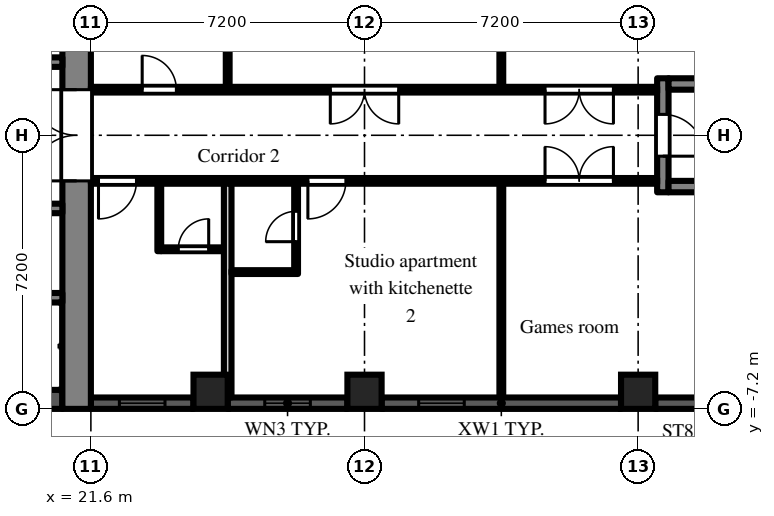
"""IFC4 building model, lengths in metres.
Left out: names, types, materials, properties, quantities, classifications, styles, units other than length and angle.
Written with IfcOpenShell. Run it as: python <this file> out.ifc"""

import sys

from ifc_helpers import new_model, si_unit, direction, frame, frame_2d, origin, origin_2d, place, context, subcontext, project, spatial, rectangle, extrude, element, fill, save


model = new_model("IFC4")
c1 = context("Model", 3, precision=1e-05, world=origin(), true_north=direction((0.0, 1.0)))
c2 = subcontext(c1, "Body", "Model", "MODEL_VIEW")
j1 = project(units=[si_unit("LENGTHUNIT", "METRE"), si_unit("PLANEANGLEUNIT", "RADIAN")], contexts=[c1])
p1 = place(None, origin())
s1 = spatial("IfcSite", under=j1, at=p1, CompositionType="ELEMENT")
p2 = place(p1, origin())
s2 = spatial("IfcBuilding", under=s1, at=p2, CompositionType="ELEMENT")
p3 = place(p2, frame((0.0, 0.0, 69.9)))
s3 = spatial("IfcBuildingStorey", under=s2, at=p3, CompositionType="ELEMENT", Elevation=69.9)
for number, where, z_axis, x_axis in (
    (1, (24.75, -6.75, 0.0), (0.0, 0.0, 1.0), (1.0, 0.0, 0.0)),
    (2, (28.8, -6.75, 0.0), (0.0, 0.0, 1.0), (1.0, 0.0, 0.0)),
    (3, (36.0, -6.75, 0.0), (0.0, 0.0, 1.0), (1.0, 0.0, 0.0)),
):
    element("IfcColumn", number, at=place(p3, frame(where, z_axis=z_axis, x_axis=x_axis)), inside=s3, PredefinedType="COLUMN", context=c2, shape_type="SweptSolid", body=[
        extrude(rectangle(XDim=0.9, YDim=0.9, at=origin_2d()), origin(), (0.0, 0.0, 1.0), 3.0),
    ])
p4 = place(p3, frame((21.6, -7.05, 0.0), z_axis=(0.0, 0.0, 1.0), x_axis=(1.0, 0.0, 0.0)))
e4 = element("IfcWall", 4, at=p4, inside=s3, PredefinedType="SOLIDWALL", context=c2, shape_type="SweptSolid", body=[
    extrude(rectangle(XDim=2.7, YDim=0.3, at=frame_2d((1.35, 0.0))), origin(), (0.0, 0.0, 1.0), 2.1),
])
p5 = place(p4, frame((0.75, 0.0, 0.2)))
e5 = element("IfcOpeningElement", 5, at=p5, cuts=e4, PredefinedType="OPENING", context=c2, shape_type="SweptSolid", body=[
    extrude(rectangle(XDim=1.2, YDim=1.85, at=frame_2d((0.6, 0.925))), frame((0.0, 0.16, 0.0), z_axis=(0.0, -1.0, 0.0), x_axis=(1.0, 0.0, 0.0)), (0.0, 0.0, 1.0), 0.32),
])
p6 = place(p3, frame((25.2, -7.05, 0.0), z_axis=(0.0, 0.0, 1.0), x_axis=(1.0, 0.0, 0.0)))
e6 = element("IfcWall", 6, at=p6, inside=s3, PredefinedType="SOLIDWALL", context=c2, shape_type="SweptSolid", body=[
    extrude(rectangle(XDim=3.15, YDim=0.3, at=frame_2d((1.575, 0.0))), origin(), (0.0, 0.0, 1.0), 2.1),
])
p7 = place(p6, frame((0.975, 0.0, 0.2)))
e7 = element("IfcOpeningElement", 7, at=p7, cuts=e6, PredefinedType="OPENING", context=c2, shape_type="SweptSolid", body=[
    extrude(rectangle(XDim=1.2, YDim=1.85, at=frame_2d((0.6, 0.925))), frame((0.0, 0.16, 0.0), z_axis=(0.0, -1.0, 0.0), x_axis=(1.0, 0.0, 0.0)), (0.0, 0.0, 1.0), 0.32),
])
p8 = place(p3, frame((29.25, -7.05, 0.0), z_axis=(0.0, 0.0, 1.0), x_axis=(1.0, 0.0, 0.0)))
e8 = element("IfcWall", 8, at=p8, inside=s3, PredefinedType="SOLIDWALL", context=c2, shape_type="SweptSolid", body=[
    extrude(rectangle(XDim=6.3, YDim=0.3, at=frame_2d((3.15, 0.0))), origin(), (0.0, 0.0, 1.0), 2.1),
])
p9 = place(p8, frame((0.975, 0.0, 0.2)))
e9 = element("IfcOpeningElement", 9, at=p9, cuts=e8, PredefinedType="OPENING", context=c2, shape_type="SweptSolid", body=[
    extrude(rectangle(XDim=1.2, YDim=1.85, at=frame_2d((0.6, 0.925))), frame((0.0, 0.16, 0.0), z_axis=(0.0, -1.0, 0.0), x_axis=(1.0, 0.0, 0.0)), (0.0, 0.0, 1.0), 0.32),
])
p10 = place(p3, frame((36.45, -7.05, 0.0), z_axis=(0.0, 0.0, 1.0), x_axis=(1.0, 0.0, 0.0)))
e10 = element("IfcWall", 10, at=p10, inside=s3, PredefinedType="SOLIDWALL", context=c2, shape_type="SweptSolid", body=[
    extrude(rectangle(XDim=2.25, YDim=0.3, at=frame_2d((1.125, 0.0))), origin(), (0.0, 0.0, 1.0), 2.1),
])
p11 = place(p3, frame((21.225, -7.2, 0.0), z_axis=(0.0, 0.0, 1.0), x_axis=(0.0, 1.0, 0.0)))
e11 = element("IfcWall", 11, at=p11, inside=s3, PredefinedType="SHEAR", context=c2, shape_type="SweptSolid", body=[
    extrude(rectangle(XDim=14.4, YDim=0.75, at=frame_2d((7.2, 0.0))), origin(), (0.0, 0.0, 1.0), 2.575),
])
p12 = place(p11, frame((6.0, 0.0, 0.0)))
e12 = element("IfcOpeningElement", 12, at=p12, cuts=e11, PredefinedType="OPENING", context=c2, shape_type="SweptSolid", body=[
    extrude(rectangle(XDim=2.4, YDim=2.2, at=frame_2d((1.2, 1.1))), frame((0.0, 0.385, 0.0), z_axis=(0.0, -1.0, 0.0), x_axis=(1.0, 0.0, 0.0)), (0.0, 0.0, 1.0), 0.77),
])
p13 = place(p3, frame((7.9, 1.925, 0.0), z_axis=(0.0, 0.0, 1.0), x_axis=(1.0, 0.0, 0.0)))
e13 = element("IfcWall", 13, at=p13, inside=s3, PredefinedType="SHEAR", context=c2, shape_type="SweptSolid", body=[
    extrude(rectangle(XDim=12.95, YDim=0.25, at=frame_2d((6.475, 0.0))), origin(), (0.0, 0.0, 1.0), 2.575),
])
p14 = place(p13, frame((0.525, 0.0, 0.0)))
e14 = element("IfcOpeningElement", 14, at=p14, cuts=e13, PredefinedType="OPENING", context=c2, shape_type="SweptSolid", body=[
    extrude(rectangle(XDim=0.9, YDim=2.1, at=frame_2d((0.45, 1.05))), frame((0.0, 0.135, 0.0), z_axis=(0.0, -1.0, 0.0), x_axis=(1.0, 0.0, 0.0)), (0.0, 0.0, 1.0), 0.27),
])
p15 = place(p13, frame((2.625, 0.0, 0.0)))
e15 = element("IfcOpeningElement", 15, at=p15, cuts=e13, PredefinedType="OPENING", context=c2, shape_type="SweptSolid", body=[
    extrude(rectangle(XDim=1.1, YDim=2.1, at=frame_2d((0.55, 1.05))), frame((0.0, 0.135, 0.0), z_axis=(0.0, -1.0, 0.0), x_axis=(1.0, 0.0, 0.0)), (0.0, 0.0, 1.0), 0.27),
])
p16 = place(p13, frame((7.125, 0.0, 0.0)))
e16 = element("IfcOpeningElement", 16, at=p16, cuts=e13, PredefinedType="OPENING", context=c2, shape_type="SweptSolid", body=[
    extrude(rectangle(XDim=0.9, YDim=2.1, at=frame_2d((0.45, 1.05))), frame((0.0, 0.135, 0.0), z_axis=(0.0, -1.0, 0.0), x_axis=(1.0, 0.0, 0.0)), (0.0, 0.0, 1.0), 0.27),
])
p17 = place(p3, frame((7.9, -6.95, 0.0), z_axis=(0.0, 0.0, 1.0), x_axis=(1.0, 0.0, 0.0)))
e17 = element("IfcWall", 17, at=p17, inside=s3, PredefinedType="SHEAR", context=c2, shape_type="SweptSolid", body=[
    extrude(rectangle(XDim=12.95, YDim=0.5, at=frame_2d((6.475, 0.0))), origin(), (0.0, 0.0, 1.0), 2.575),
])
p18 = place(p3, frame((7.9, -1.925, 0.0), z_axis=(0.0, 0.0, 1.0), x_axis=(1.0, 0.0, 0.0)))
e18 = element("IfcWall", 18, at=p18, inside=s3, PredefinedType="SHEAR", context=c2, shape_type="SweptSolid", body=[
    extrude(rectangle(XDim=12.95, YDim=0.25, at=frame_2d((6.475, 0.0))), origin(), (0.0, 0.0, 1.0), 2.575),
])
p19 = place(p18, frame((4.825, 0.0, 0.0)))
e19 = element("IfcOpeningElement", 19, at=p19, cuts=e18, PredefinedType="OPENING", context=c2, shape_type="SweptSolid", body=[
    extrude(rectangle(XDim=1.1, YDim=2.1, at=frame_2d((0.55, 1.05))), frame((0.0, 0.135, 0.0), z_axis=(0.0, -1.0, 0.0), x_axis=(1.0, 0.0, 0.0)), (0.0, 0.0, 1.0), 0.27),
])
p20 = place(p18, frame((7.025, 0.0, 0.0)))
e20 = element("IfcOpeningElement", 20, at=p20, cuts=e18, PredefinedType="OPENING", context=c2, shape_type="SweptSolid", body=[
    extrude(rectangle(XDim=1.1, YDim=2.1, at=frame_2d((0.55, 1.05))), frame((0.0, 0.135, 0.0), z_axis=(0.0, -1.0, 0.0), x_axis=(1.0, 0.0, 0.0)), (0.0, 0.0, 1.0), 0.27),
])
p21 = place(p18, frame((9.225, 0.0, 0.0)))
e21 = element("IfcOpeningElement", 21, at=p21, cuts=e18, PredefinedType="OPENING", context=c2, shape_type="SweptSolid", body=[
    extrude(rectangle(XDim=1.1, YDim=2.1, at=frame_2d((0.55, 1.05))), frame((0.0, 0.135, 0.0), z_axis=(0.0, -1.0, 0.0), x_axis=(1.0, 0.0, 0.0)), (0.0, 0.0, 1.0), 0.27),
])
p22 = place(p18, frame((0.525, 0.0, 0.0)))
e22 = element("IfcOpeningElement", 22, at=p22, cuts=e18, PredefinedType="OPENING", context=c2, shape_type="SweptSolid", body=[
    extrude(rectangle(XDim=0.9, YDim=2.1, at=frame_2d((0.45, 1.05))), frame((0.0, 0.135, 0.0), z_axis=(0.0, -1.0, 0.0), x_axis=(1.0, 0.0, 0.0)), (0.0, 0.0, 1.0), 0.27),
])
p23 = place(p18, frame((2.625, 0.0, 0.0)))
e23 = element("IfcOpeningElement", 23, at=p23, cuts=e18, PredefinedType="OPENING", context=c2, shape_type="SweptSolid", body=[
    extrude(rectangle(XDim=1.1, YDim=2.1, at=frame_2d((0.55, 1.05))), frame((0.0, 0.135, 0.0), z_axis=(0.0, -1.0, 0.0), x_axis=(1.0, 0.0, 0.0)), (0.0, 0.0, 1.0), 0.27),
])
p24 = place(p3, frame((12.3, -4.275, 0.0), z_axis=(0.0, 0.0, 1.0), x_axis=(1.0, 0.0, 0.0)))
e24 = element("IfcWall", 24, at=p24, inside=s3, PredefinedType="SHEAR", context=c2, shape_type="SweptSolid", body=[
    extrude(rectangle(XDim=8.55, YDim=0.25, at=frame_2d((4.275, 0.0))), origin(), (0.0, 0.0, 1.0), 2.575),
])
p25 = place(p3, frame((36.65, -1.5, 0.0), z_axis=(0.0, 0.0, 1.0), x_axis=(0.0, 1.0, 0.0)))
e25 = element("IfcWall", 25, at=p25, inside=s3, PredefinedType="SHEAR", context=c2, shape_type="SweptSolid", body=[
    extrude(rectangle(XDim=3.0, YDim=0.3, at=frame_2d((1.5, 0.0))), origin(), (0.0, 0.0, 1.0), 2.575),
])
p26 = place(p25, frame((0.95, 0.0, 0.0)))
e26 = element("IfcOpeningElement", 26, at=p26, cuts=e25, PredefinedType="OPENING", context=c2, shape_type="SweptSolid", body=[
    extrude(rectangle(XDim=1.1, YDim=2.1, at=frame_2d((0.55, 1.05))), frame((0.0, 0.16, 0.0), z_axis=(0.0, -1.0, 0.0), x_axis=(1.0, 0.0, 0.0)), (0.0, 0.0, 1.0), 0.32),
])
for number, where, z_axis, x_axis in (
    (27, (36.8, -1.35, 0.0), (0.0, 0.0, 1.0), (1.0, 0.0, 0.0)),
    (28, (36.8, 1.35, 0.0), (0.0, 0.0, 1.0), (1.0, 0.0, 0.0)),
):
    element("IfcWall", number, at=place(p3, frame(where, z_axis=z_axis, x_axis=x_axis)), inside=s3, PredefinedType="SHEAR", context=c2, shape_type="SweptSolid", body=[
        extrude(rectangle(XDim=5.8, YDim=0.3, at=frame_2d((2.9, 0.0))), origin(), (0.0, 0.0, 1.0), 2.575),
    ])
p27 = place(p3, frame((21.6, -1.2, 0.0), z_axis=(0.0, 0.0, 1.0), x_axis=(1.0, 0.0, 0.0)))
e29 = element("IfcWall", 29, at=p27, inside=s3, PredefinedType="PARTITIONING", context=c2, shape_type="SweptSolid", body=[
    extrude(rectangle(XDim=14.9, YDim=0.15, at=frame_2d((7.45, 0.0))), origin(), (0.0, 0.0, 1.0), 2.575),
])
p28 = place(p27, frame((0.2, 0.0, 0.0)))
e30 = element("IfcOpeningElement", 30, at=p28, cuts=e29, PredefinedType="OPENING", context=c2, shape_type="SweptSolid", body=[
    extrude(rectangle(XDim=1.0, YDim=2.1, at=frame_2d((0.5, 1.05))), frame((0.0, 0.085, 0.0), z_axis=(0.0, -1.0, 0.0), x_axis=(1.0, 0.0, 0.0)), (0.0, 0.0, 1.0), 0.17),
])
p29 = place(p27, frame((5.71, 0.0, 0.0)))
e31 = element("IfcOpeningElement", 31, at=p29, cuts=e29, PredefinedType="OPENING", context=c2, shape_type="SweptSolid", body=[
    extrude(rectangle(XDim=1.0, YDim=2.1, at=frame_2d((0.5, 1.05))), frame((0.0, 0.085, 0.0), z_axis=(0.0, -1.0, 0.0), x_axis=(1.0, 0.0, 0.0)), (0.0, 0.0, 1.0), 0.17),
])
p30 = place(p27, frame((11.95, 0.0, 0.0)))
e32 = element("IfcOpeningElement", 32, at=p30, cuts=e29, PredefinedType="OPENING", context=c2, shape_type="SweptSolid", body=[
    extrude(rectangle(XDim=1.8, YDim=2.1, at=frame_2d((0.9, 1.05))), frame((0.0, 0.085, 0.0), z_axis=(0.0, -1.0, 0.0), x_axis=(1.0, 0.0, 0.0)), (0.0, 0.0, 1.0), 0.17),
])
p31 = place(p3, frame((21.6, 1.2, 0.0), z_axis=(0.0, 0.0, 1.0), x_axis=(1.0, 0.0, 0.0)))
e33 = element("IfcWall", 33, at=p31, inside=s3, PredefinedType="PARTITIONING", context=c2, shape_type="SweptSolid", body=[
    extrude(rectangle(XDim=14.9, YDim=0.15, at=frame_2d((7.45, 0.0))), origin(), (0.0, 0.0, 1.0), 2.575),
])
p32 = place(p31, frame((1.35, 0.0, 0.0)))
e34 = element("IfcOpeningElement", 34, at=p32, cuts=e33, PredefinedType="OPENING", context=c2, shape_type="SweptSolid", body=[
    extrude(rectangle(XDim=0.9, YDim=2.1, at=frame_2d((0.45, 1.05))), frame((0.0, 0.085, 0.0), z_axis=(0.0, -1.0, 0.0), x_axis=(1.0, 0.0, 0.0)), (0.0, 0.0, 1.0), 0.17),
])
p33 = place(p31, frame((6.3, 0.0, 0.0)))
e35 = element("IfcOpeningElement", 35, at=p33, cuts=e33, PredefinedType="OPENING", context=c2, shape_type="SweptSolid", body=[
    extrude(rectangle(XDim=1.8, YDim=2.1, at=frame_2d((0.9, 1.05))), frame((0.0, 0.085, 0.0), z_axis=(0.0, -1.0, 0.0), x_axis=(1.0, 0.0, 0.0)), (0.0, 0.0, 1.0), 0.17),
])
p34 = place(p31, frame((11.95, 0.0, 0.0)))
e36 = element("IfcOpeningElement", 36, at=p34, cuts=e33, PredefinedType="OPENING", context=c2, shape_type="SweptSolid", body=[
    extrude(rectangle(XDim=1.8, YDim=2.1, at=frame_2d((0.9, 1.05))), frame((0.0, 0.085, 0.0), z_axis=(0.0, -1.0, 0.0), x_axis=(1.0, 0.0, 0.0)), (0.0, 0.0, 1.0), 0.17),
])
p35 = place(p3, frame((23.4, -3.05, 0.0), z_axis=(0.0, 0.0, 1.0), x_axis=(0.0, 1.0, 0.0)))
e37 = element("IfcWall", 37, at=p35, inside=s3, PredefinedType="PARTITIONING", context=c2, shape_type="SweptSolid", body=[
    extrude(rectangle(XDim=1.775, YDim=0.1, at=frame_2d((0.888, 0.0))), origin(), (0.0, 0.0, 1.0), 2.575),
])
p36 = place(p3, frame((23.45, -3.0, 0.0), z_axis=(0.0, 0.0, 1.0), x_axis=(1.0, 0.0, 0.0)))
e38 = element("IfcWall", 38, at=p36, inside=s3, PredefinedType="PARTITIONING", context=c2, shape_type="SweptSolid", body=[
    extrude(rectangle(XDim=1.65, YDim=0.1, at=frame_2d((0.825, 0.0))), origin(), (0.0, 0.0, 1.0), 2.575),
])
p37 = place(p36, frame((0.45, 0.0, 0.0)))
e39 = element("IfcOpeningElement", 39, at=p37, cuts=e38, PredefinedType="OPENING", context=c2, shape_type="SweptSolid", body=[
    extrude(rectangle(XDim=0.8, YDim=2.1, at=frame_2d((0.4, 1.05))), frame((0.0, 0.06, 0.0), z_axis=(0.0, -1.0, 0.0), x_axis=(1.0, 0.0, 0.0)), (0.0, 0.0, 1.0), 0.12),
])
p38 = place(p3, frame((25.2, -6.9, 0.0), z_axis=(0.0, 0.0, 1.0), x_axis=(0.0, 1.0, 0.0)))
e40 = element("IfcWall", 40, at=p38, inside=s3, PredefinedType="PARTITIONING", context=c2, shape_type="SweptSolid", body=[
    extrude(rectangle(XDim=5.625, YDim=0.2, at=frame_2d((2.812, 0.0))), origin(), (0.0, 0.0, 1.0), 2.575),
])
p39 = place(p3, frame((25.3, -3.6, 0.0), z_axis=(0.0, 0.0, 1.0), x_axis=(1.0, 0.0, 0.0)))
e41 = element("IfcWall", 41, at=p39, inside=s3, PredefinedType="PARTITIONING", context=c2, shape_type="SweptSolid", body=[
    extrude(rectangle(XDim=1.75, YDim=0.1, at=frame_2d((0.875, 0.0))), origin(), (0.0, 0.0, 1.0), 2.575),
])
p40 = place(p3, frame((25.2, 1.275, 0.0), z_axis=(0.0, 0.0, 1.0), x_axis=(0.0, 1.0, 0.0)))
e42 = element("IfcWall", 42, at=p40, inside=s3, PredefinedType="PARTITIONING", context=c2, shape_type="SweptSolid", body=[
    extrude(rectangle(XDim=5.625, YDim=0.1, at=frame_2d((2.812, 0.0))), origin(), (0.0, 0.0, 1.0), 2.575),
])
p41 = place(p3, frame((27.0, -3.55, 0.0), z_axis=(0.0, 0.0, 1.0), x_axis=(0.0, 1.0, 0.0)))
e43 = element("IfcWall", 43, at=p41, inside=s3, PredefinedType="PARTITIONING", context=c2, shape_type="SweptSolid", body=[
    extrude(rectangle(XDim=2.275, YDim=0.1, at=frame_2d((1.138, 0.0))), origin(), (0.0, 0.0, 1.0), 2.575),
])
p42 = place(p41, frame((0.75, 0.0, 0.0)))
e44 = element("IfcOpeningElement", 44, at=p42, cuts=e43, PredefinedType="OPENING", context=c2, shape_type="SweptSolid", body=[
    extrude(rectangle(XDim=0.8, YDim=2.1, at=frame_2d((0.4, 1.05))), frame((0.0, 0.06, 0.0), z_axis=(0.0, -1.0, 0.0), x_axis=(1.0, 0.0, 0.0)), (0.0, 0.0, 1.0), 0.12),
])
for number, where, z_axis, x_axis in (
    (45, (32.4, -6.9, 0.0), (0.0, 0.0, 1.0), (0.0, 1.0, 0.0)),
    (46, (32.4, 1.275, 0.0), (0.0, 0.0, 1.0), (0.0, 1.0, 0.0)),
):
    element("IfcWall", number, at=place(p3, frame(where, z_axis=z_axis, x_axis=x_axis)), inside=s3, PredefinedType="PARTITIONING", context=c2, shape_type="SweptSolid", body=[
        extrude(rectangle(XDim=5.625, YDim=0.1, at=frame_2d((2.812, 0.0))), origin(), (0.0, 0.0, 1.0), 2.575),
    ])
p43 = place(p5, origin())
e47 = element("IfcWindow", 47, at=p43, inside=s3, PartitioningType="SINGLE_PANEL", PredefinedType="WINDOW", context=c2, shape_type="SweptSolid", body=[
    extrude(rectangle(XDim=1.2, YDim=1.85, at=frame_2d((0.6, 0.925))), frame((0.0, 0.03, 0.0), z_axis=(0.0, -1.0, 0.0), x_axis=(1.0, 0.0, 0.0)), (0.0, 0.0, 1.0), 0.06),
])
fill(e5, e47)
p44 = place(p7, origin())
e48 = element("IfcWindow", 48, at=p44, inside=s3, PartitioningType="SINGLE_PANEL", PredefinedType="WINDOW", context=c2, shape_type="SweptSolid", body=[
    extrude(rectangle(XDim=1.2, YDim=1.85, at=frame_2d((0.6, 0.925))), frame((0.0, 0.03, 0.0), z_axis=(0.0, -1.0, 0.0), x_axis=(1.0, 0.0, 0.0)), (0.0, 0.0, 1.0), 0.06),
])
fill(e7, e48)
p45 = place(p9, origin())
e49 = element("IfcWindow", 49, at=p45, inside=s3, PartitioningType="SINGLE_PANEL", PredefinedType="WINDOW", context=c2, shape_type="SweptSolid", body=[
    extrude(rectangle(XDim=1.2, YDim=1.85, at=frame_2d((0.6, 0.925))), frame((0.0, 0.03, 0.0), z_axis=(0.0, -1.0, 0.0), x_axis=(1.0, 0.0, 0.0)), (0.0, 0.0, 1.0), 0.06),
])
fill(e9, e49)
p46 = place(p12, origin())
e50 = element("IfcDoor", 50, at=p46, inside=s3, OperationType="DOUBLE_DOOR_DOUBLE_SWING", PredefinedType="DOOR", context=c2, shape_type="SweptSolid", body=[
    extrude(rectangle(XDim=2.4, YDim=2.2, at=frame_2d((1.2, 1.1))), frame((0.0, 0.025, 0.0), z_axis=(0.0, -1.0, 0.0), x_axis=(1.0, 0.0, 0.0)), (0.0, 0.0, 1.0), 0.05),
])
fill(e12, e50)
p47 = place(p26, frame((1.1, 0.0, 0.0), z_axis=(0.0, 0.0, 1.0), x_axis=(-1.0, 0.0, 0.0)))
e51 = element("IfcDoor", 51, at=p47, inside=s3, OperationType="SINGLE_SWING_RIGHT", PredefinedType="DOOR", context=c2, shape_type="SweptSolid", body=[
    extrude(rectangle(XDim=1.1, YDim=2.1, at=frame_2d((0.55, 1.05))), frame((0.0, 0.025, 0.0), z_axis=(0.0, -1.0, 0.0), x_axis=(1.0, 0.0, 0.0)), (0.0, 0.0, 1.0), 0.05),
])
fill(e26, e51)
p48 = place(p32, origin())
e52 = element("IfcDoor", 52, at=p48, inside=s3, OperationType="SINGLE_SWING_LEFT", PredefinedType="DOOR", context=c2, shape_type="SweptSolid", body=[
    extrude(rectangle(XDim=0.9, YDim=2.1, at=frame_2d((0.45, 1.05))), frame((0.0, 0.025, 0.0), z_axis=(0.0, -1.0, 0.0), x_axis=(1.0, 0.0, 0.0)), (0.0, 0.0, 1.0), 0.05),
])
fill(e34, e52)
p49 = place(p33, frame((1.8, 0.0, 0.0), z_axis=(0.0, 0.0, 1.0), x_axis=(-1.0, 0.0, 0.0)))
e53 = element("IfcDoor", 53, at=p49, inside=s3, OperationType="DOUBLE_DOOR_DOUBLE_SWING", PredefinedType="DOOR", context=c2, shape_type="SweptSolid", body=[
    extrude(rectangle(XDim=1.8, YDim=2.1, at=frame_2d((0.9, 1.05))), frame((0.0, 0.025, 0.0), z_axis=(0.0, -1.0, 0.0), x_axis=(1.0, 0.0, 0.0)), (0.0, 0.0, 1.0), 0.05),
])
fill(e35, e53)
p50 = place(p34, frame((1.8, 0.0, 0.0), z_axis=(0.0, 0.0, 1.0), x_axis=(-1.0, 0.0, 0.0)))
e54 = element("IfcDoor", 54, at=p50, inside=s3, OperationType="DOUBLE_DOOR_DOUBLE_SWING", PredefinedType="DOOR", context=c2, shape_type="SweptSolid", body=[
    extrude(rectangle(XDim=1.8, YDim=2.1, at=frame_2d((0.9, 1.05))), frame((0.0, 0.025, 0.0), z_axis=(0.0, -1.0, 0.0), x_axis=(1.0, 0.0, 0.0)), (0.0, 0.0, 1.0), 0.05),
])
fill(e36, e54)
p51 = place(p37, origin())
e55 = element("IfcDoor", 55, at=p51, inside=s3, OperationType="SINGLE_SWING_RIGHT", PredefinedType="DOOR", context=c2, shape_type="SweptSolid", body=[
    extrude(rectangle(XDim=0.8, YDim=2.1, at=frame_2d((0.4, 1.05))), frame((0.0, 0.025, 0.0), z_axis=(0.0, -1.0, 0.0), x_axis=(1.0, 0.0, 0.0)), (0.0, 0.0, 1.0), 0.05),
])
fill(e39, e55)
p52 = place(p28, frame((1.0, 0.0, 0.0), z_axis=(0.0, 0.0, 1.0), x_axis=(-1.0, 0.0, 0.0)))
e56 = element("IfcDoor", 56, at=p52, inside=s3, OperationType="SINGLE_SWING_RIGHT", PredefinedType="DOOR", context=c2, shape_type="SweptSolid", body=[
    extrude(rectangle(XDim=1.0, YDim=2.1, at=frame_2d((0.5, 1.05))), frame((0.0, 0.025, 0.0), z_axis=(0.0, -1.0, 0.0), x_axis=(1.0, 0.0, 0.0)), (0.0, 0.0, 1.0), 0.05),
])
fill(e30, e56)
p53 = place(p42, origin())
e57 = element("IfcDoor", 57, at=p53, inside=s3, OperationType="SINGLE_SWING_LEFT", PredefinedType="DOOR", context=c2, shape_type="SweptSolid", body=[
    extrude(rectangle(XDim=0.8, YDim=2.1, at=frame_2d((0.4, 1.05))), frame((0.0, 0.025, 0.0), z_axis=(0.0, -1.0, 0.0), x_axis=(1.0, 0.0, 0.0)), (0.0, 0.0, 1.0), 0.05),
])
fill(e44, e57)
p54 = place(p29, frame((1.0, 0.0, 0.0), z_axis=(0.0, 0.0, 1.0), x_axis=(-1.0, 0.0, 0.0)))
e58 = element("IfcDoor", 58, at=p54, inside=s3, OperationType="SINGLE_SWING_RIGHT", PredefinedType="DOOR", context=c2, shape_type="SweptSolid", body=[
    extrude(rectangle(XDim=1.0, YDim=2.1, at=frame_2d((0.5, 1.05))), frame((0.0, 0.025, 0.0), z_axis=(0.0, -1.0, 0.0), x_axis=(1.0, 0.0, 0.0)), (0.0, 0.0, 1.0), 0.05),
])
fill(e31, e58)
p55 = place(p30, origin())
e59 = element("IfcDoor", 59, at=p55, inside=s3, OperationType="DOUBLE_DOOR_DOUBLE_SWING", PredefinedType="DOOR", context=c2, shape_type="SweptSolid", body=[
    extrude(rectangle(XDim=1.8, YDim=2.1, at=frame_2d((0.9, 1.05))), frame((0.0, 0.025, 0.0), z_axis=(0.0, -1.0, 0.0), x_axis=(1.0, 0.0, 0.0)), (0.0, 0.0, 1.0), 0.05),
])
fill(e32, e59)
save(model, sys.argv[1])
